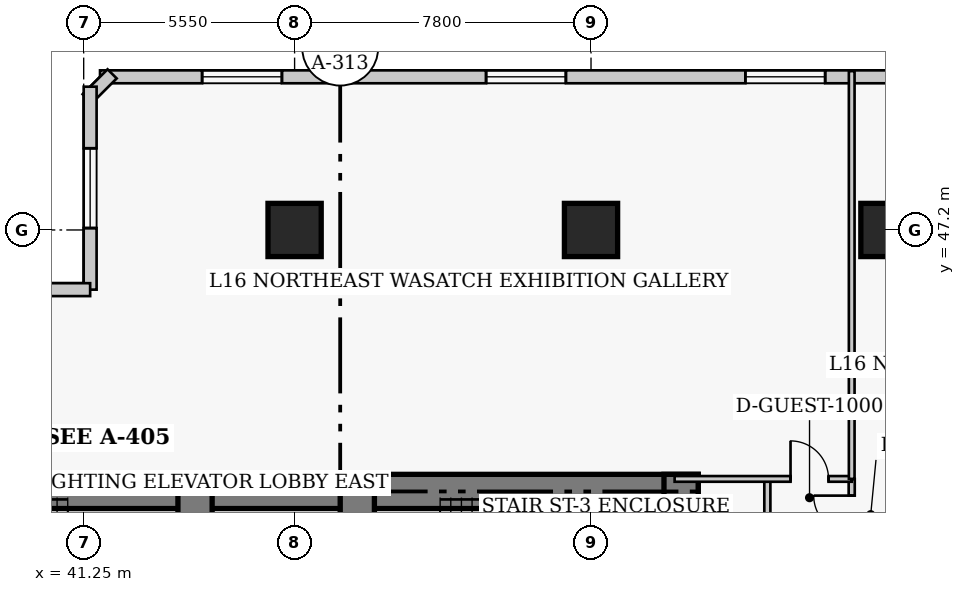
"""IFC4 building model, lengths in metres.
Left out: names, types, materials, properties, quantities, classifications, styles, units other than length and angle.
Written with IfcOpenShell. Run it as: python <this file> out.ifc"""

import sys

from ifc_helpers import new_model, si_unit, direction, frame, frame_2d, origin, origin_2d, place, context, subcontext, project, spatial, rectangle, extrude, element, fill, save


model = new_model("IFC4")
c1 = context("Model", 3, precision=1e-05, world=origin(), true_north=direction((0.0, 1.0)))
c2 = subcontext(c1, "Body", "Model", "MODEL_VIEW")
j1 = project(units=[si_unit("LENGTHUNIT", "METRE"), si_unit("PLANEANGLEUNIT", "RADIAN")], contexts=[c1])
p1 = place(None, origin())
s1 = spatial("IfcSite", under=j1, at=p1, CompositionType="ELEMENT")
p2 = place(p1, origin())
s2 = spatial("IfcBuilding", under=s1, at=p2, CompositionType="ELEMENT")
p3 = place(p2, frame((0.0, 0.0, 67.8)))
s3 = spatial("IfcBuildingStorey", under=s2, at=p3, CompositionType="ELEMENT", Elevation=67.8)
p4 = place(p3, frame((35.85, 40.32, 0.0), z_axis=(0.0, 0.0, 1.0), x_axis=(1.0, 0.0, 0.0)))
e1 = element("IfcWall", 1, at=p4, inside=s3, PredefinedType="SHEAR", context=c2, shape_type="SweptSolid", body=[
    extrude(rectangle(XDim=12.6, YDim=0.9, at=frame_2d((6.3, 0.0))), origin(), (0.0, 0.0, 1.0), 3.8),
])
p5 = place(p3, frame((48.45, 40.32, 0.0), z_axis=(0.0, 0.0, 1.0), x_axis=(1.0, 0.0, 0.0)))
e2 = element("IfcWall", 2, at=p5, inside=s3, PredefinedType="SHEAR", context=c2, shape_type="SweptSolid", body=[
    extrude(rectangle(XDim=8.97, YDim=0.9, at=frame_2d((4.485, 0.0))), origin(), (0.0, 0.0, 1.0), 3.8),
])
p6 = place(p3, frame((56.97, 27.05, 0.0), z_axis=(0.0, 0.0, 1.0), x_axis=(0.0, 1.0, 0.0)))
e3 = element("IfcWall", 3, at=p6, inside=s3, PredefinedType="SHEAR", context=c2, shape_type="SweptSolid", body=[
    extrude(rectangle(XDim=13.72, YDim=0.9, at=frame_2d((6.86, 0.0))), origin(), (0.0, 0.0, 1.0), 3.8),
])
p7 = place(p3, frame((44.18, 36.37, 0.0), z_axis=(0.0, 0.0, 1.0), x_axis=(0.0, 1.0, 0.0)))
e4 = element("IfcWall", 4, at=p7, inside=s3, PredefinedType="SHEAR", context=c2, shape_type="SweptSolid", body=[
    extrude(rectangle(XDim=3.95, YDim=0.9, at=frame_2d((1.975, 0.0))), origin(), (0.0, 0.0, 1.0), 3.8),
])
p8 = place(p3, frame((48.45, 32.3, 0.0), z_axis=(0.0, 0.0, 1.0), x_axis=(0.0, 1.0, 0.0)))
e5 = element("IfcWall", 5, at=p8, inside=s3, PredefinedType="SHEAR", context=c2, shape_type="SweptSolid", body=[
    extrude(rectangle(XDim=8.02, YDim=0.9, at=frame_2d((4.01, 0.0))), origin(), (0.0, 0.0, 1.0), 3.8),
])
p9 = place(p8, frame((5.9, 0.0, 0.0)))
e6 = element("IfcOpeningElement", 6, at=p9, cuts=e5, PredefinedType="OPENING", context=c2, shape_type="SweptSolid", body=[
    extrude(rectangle(XDim=1.1, YDim=2.15, at=frame_2d((0.55, 1.075))), frame((0.0, 0.46, 0.0), z_axis=(0.0, -1.0, 0.0), x_axis=(1.0, 0.0, 0.0)), (0.0, 0.0, 1.0), 0.92),
])
for number, where, z_axis, x_axis in (
    (7, (46.8, 47.2, 0.0), (0.0, 0.0, 1.0), (1.0, 0.0, 0.0)),
    (8, (54.6, 47.2, 0.0), (0.0, 0.0, 1.0), (1.0, 0.0, 0.0)),
    (9, (62.4, 47.2, 0.0), (0.0, 0.0, 1.0), (1.0, 0.0, 0.0)),
):
    element("IfcColumn", number, at=place(p3, frame(where, z_axis=z_axis, x_axis=x_axis)), inside=s3, PredefinedType="COLUMN", context=c2, shape_type="SweptSolid", body=[
        extrude(rectangle(XDim=1.4, YDim=1.4, at=origin_2d()), origin(), (0.0, 0.0, 1.0), 3.8),
    ])
p10 = place(p3, frame((71.57, 51.23, 0.0), z_axis=(0.0, 0.0, 1.0), x_axis=(-1.0, 0.0, 0.0)))
e10 = element("IfcWall", 10, at=p10, inside=s3, PredefinedType="SOLIDWALL", context=c2, shape_type="SweptSolid", body=[
    extrude(rectangle(XDim=29.89, YDim=0.34, at=frame_2d((14.945, 0.0))), origin(), (0.0, 0.0, 1.0), 3.54),
])
p11 = place(p10, frame((2.686, 0.0, 0.85)))
e11 = element("IfcOpeningElement", 11, at=p11, cuts=e10, PredefinedType="OPENING", context=c2, shape_type="SweptSolid", body=[
    extrude(rectangle(XDim=2.1, YDim=1.85, at=frame_2d((1.05, 0.925))), frame((0.0, 0.18, 0.0), z_axis=(0.0, -1.0, 0.0), x_axis=(1.0, 0.0, 0.0)), (0.0, 0.0, 1.0), 0.36),
])
p12 = place(p10, frame((10.809, 0.0, 0.85)))
e12 = element("IfcOpeningElement", 12, at=p12, cuts=e10, PredefinedType="OPENING", context=c2, shape_type="SweptSolid", body=[
    extrude(rectangle(XDim=2.1, YDim=1.85, at=frame_2d((1.05, 0.925))), frame((0.0, 0.18, 0.0), z_axis=(0.0, -1.0, 0.0), x_axis=(1.0, 0.0, 0.0)), (0.0, 0.0, 1.0), 0.36),
])
p13 = place(p10, frame((17.631, 0.0, 0.85)))
e13 = element("IfcOpeningElement", 13, at=p13, cuts=e10, PredefinedType="OPENING", context=c2, shape_type="SweptSolid", body=[
    extrude(rectangle(XDim=2.1, YDim=1.85, at=frame_2d((1.05, 0.925))), frame((0.0, 0.18, 0.0), z_axis=(0.0, -1.0, 0.0), x_axis=(1.0, 0.0, 0.0)), (0.0, 0.0, 1.0), 0.36),
])
p14 = place(p10, frame((25.104, 0.0, 0.85)))
e14 = element("IfcOpeningElement", 14, at=p14, cuts=e10, PredefinedType="OPENING", context=c2, shape_type="SweptSolid", body=[
    extrude(rectangle(XDim=2.1, YDim=1.85, at=frame_2d((1.05, 0.925))), frame((0.0, 0.18, 0.0), z_axis=(0.0, -1.0, 0.0), x_axis=(1.0, 0.0, 0.0)), (0.0, 0.0, 1.0), 0.36),
])
p15 = place(p3, frame((41.999, 51.308, 0.0), z_axis=(0.0, 0.0, 1.0), x_axis=(-0.707238225886, -0.706975312048, 0.0)))
e15 = element("IfcWall", 15, at=p15, inside=s3, PredefinedType="SOLIDWALL", context=c2, shape_type="SweptSolid", body=[
    extrude(rectangle(XDim=0.929, YDim=0.34, at=frame_2d((0.464, 0.0))), origin(), (0.0, 0.0, 1.0), 3.54),
])
p16 = place(p3, frame((41.42, 50.97, 0.0), z_axis=(0.0, 0.0, 1.0), x_axis=(0.0, -1.0, 0.0)))
e16 = element("IfcWall", 16, at=p16, inside=s3, PredefinedType="SOLIDWALL", context=c2, shape_type="SweptSolid", body=[
    extrude(rectangle(XDim=5.34, YDim=0.34, at=frame_2d((2.67, 0.0))), origin(), (0.0, 0.0, 1.0), 3.54),
])
p17 = place(p16, frame((1.62, 0.0, 0.85)))
e17 = element("IfcOpeningElement", 17, at=p17, cuts=e16, PredefinedType="OPENING", context=c2, shape_type="SweptSolid", body=[
    extrude(rectangle(XDim=2.1, YDim=1.85, at=frame_2d((1.05, 0.925))), frame((0.0, 0.18, 0.0), z_axis=(0.0, -1.0, 0.0), x_axis=(1.0, 0.0, 0.0)), (0.0, 0.0, 1.0), 0.36),
])
p18 = place(p3, frame((41.42, 45.63, 0.0), z_axis=(0.0, 0.0, 1.0), x_axis=(-1.0, 0.0, 0.0)))
e18 = element("IfcWall", 18, at=p18, inside=s3, PredefinedType="SOLIDWALL", context=c2, shape_type="SweptSolid", body=[
    extrude(rectangle(XDim=4.84, YDim=0.34, at=frame_2d((2.42, 0.0))), origin(), (0.0, 0.0, 1.0), 3.54),
])
p19 = place(p18, frame((1.37, 0.0, 0.85)))
e19 = element("IfcOpeningElement", 19, at=p19, cuts=e18, PredefinedType="OPENING", context=c2, shape_type="SweptSolid", body=[
    extrude(rectangle(XDim=2.1, YDim=1.85, at=frame_2d((1.05, 0.925))), frame((0.0, 0.18, 0.0), z_axis=(0.0, -1.0, 0.0), x_axis=(1.0, 0.0, 0.0)), (0.0, 0.0, 1.0), 0.36),
])
p20 = place(p3, frame((61.46, 10.25, 0.0), z_axis=(0.0, 0.0, 1.0), x_axis=(0.0, 1.0, 0.0)))
e20 = element("IfcWall", 20, at=p20, inside=s3, PredefinedType="PARTITIONING", context=c2, shape_type="SweptSolid", body=[
    extrude(rectangle(XDim=30.4, YDim=0.16, at=frame_2d((15.2, 0.0))), origin(), (0.0, 0.0, 1.0), 3.54),
])
p21 = place(p20, frame((4.4, 0.0, 0.0)))
e21 = element("IfcOpeningElement", 21, at=p21, cuts=e20, PredefinedType="OPENING", context=c2, shape_type="SweptSolid", body=[
    extrude(rectangle(XDim=0.95, YDim=2.1, at=frame_2d((0.475, 1.05))), frame((0.0, 0.09, 0.0), z_axis=(0.0, -1.0, 0.0), x_axis=(1.0, 0.0, 0.0)), (0.0, 0.0, 1.0), 0.18),
])
p22 = place(p20, frame((13.337, 0.0, 0.0)))
e22 = element("IfcOpeningElement", 22, at=p22, cuts=e20, PredefinedType="OPENING", context=c2, shape_type="SweptSolid", body=[
    extrude(rectangle(XDim=0.95, YDim=2.1, at=frame_2d((0.475, 1.05))), frame((0.0, 0.09, 0.0), z_axis=(0.0, -1.0, 0.0), x_axis=(1.0, 0.0, 0.0)), (0.0, 0.0, 1.0), 0.18),
])
p23 = place(p20, frame((21.462, 0.0, 0.0)))
e23 = element("IfcOpeningElement", 23, at=p23, cuts=e20, PredefinedType="OPENING", context=c2, shape_type="SweptSolid", body=[
    extrude(rectangle(XDim=0.95, YDim=2.1, at=frame_2d((0.475, 1.05))), frame((0.0, 0.09, 0.0), z_axis=(0.0, -1.0, 0.0), x_axis=(1.0, 0.0, 0.0)), (0.0, 0.0, 1.0), 0.18),
])
p24 = place(p20, frame((28.96, 0.0, 0.0)))
e24 = element("IfcOpeningElement", 24, at=p24, cuts=e20, PredefinedType="OPENING", context=c2, shape_type="SweptSolid", body=[
    extrude(rectangle(XDim=1.0, YDim=2.15, at=frame_2d((0.5, 1.075))), frame((0.0, 0.09, 0.0), z_axis=(0.0, -1.0, 0.0), x_axis=(1.0, 0.0, 0.0)), (0.0, 0.0, 1.0), 0.18),
])
p25 = place(p3, frame((59.24, 26.26, 0.0), z_axis=(0.0, 0.0, 1.0), x_axis=(0.0, 1.0, 0.0)))
e25 = element("IfcWall", 25, at=p25, inside=s3, PredefinedType="PARTITIONING", context=c2, shape_type="SweptSolid", body=[
    extrude(rectangle(XDim=14.39, YDim=0.16, at=frame_2d((7.195, 0.0))), origin(), (0.0, 0.0, 1.0), 3.54),
])
p26 = place(p3, frame((56.8, 40.65, 0.0), z_axis=(0.0, 0.0, 1.0), x_axis=(1.0, 0.0, 0.0)))
e26 = element("IfcWall", 26, at=p26, inside=s3, PredefinedType="PARTITIONING", context=c2, shape_type="SweptSolid", body=[
    extrude(rectangle(XDim=4.66, YDim=0.15, at=frame_2d((2.33, 0.0))), origin(), (0.0, 0.0, 1.0), 3.54),
])
p27 = place(p26, frame((3.05, 0.0, 0.0)))
e27 = element("IfcOpeningElement", 27, at=p27, cuts=e26, PredefinedType="OPENING", context=c2, shape_type="SweptSolid", body=[
    extrude(rectangle(XDim=1.0, YDim=2.15, at=frame_2d((0.5, 1.075))), frame((0.0, 0.085, 0.0), z_axis=(0.0, -1.0, 0.0), x_axis=(1.0, 0.0, 0.0)), (0.0, 0.0, 1.0), 0.17),
])
p28 = place(p3, frame((61.46, 40.65, 0.0), z_axis=(0.0, 0.0, 1.0), x_axis=(0.0, 1.0, 0.0)))
e28 = element("IfcWall", 28, at=p28, inside=s3, PredefinedType="PARTITIONING", context=c2, shape_type="SweptSolid", body=[
    extrude(rectangle(XDim=10.73, YDim=0.15, at=frame_2d((5.365, 0.0))), origin(), (0.0, 0.0, 1.0), 3.54),
])
p29 = place(p12, origin())
e29 = element("IfcWindow", 29, at=p29, inside=s3, PartitioningType="SINGLE_PANEL", PredefinedType="WINDOW", context=c2, shape_type="SweptSolid", body=[
    extrude(rectangle(XDim=2.1, YDim=1.85, at=frame_2d((1.05, 0.925))), frame((0.0, 0.03, 0.0), z_axis=(0.0, -1.0, 0.0), x_axis=(1.0, 0.0, 0.0)), (0.0, 0.0, 1.0), 0.06),
])
fill(e12, e29)
p30 = place(p13, origin())
e30 = element("IfcWindow", 30, at=p30, inside=s3, PartitioningType="SINGLE_PANEL", PredefinedType="WINDOW", context=c2, shape_type="SweptSolid", body=[
    extrude(rectangle(XDim=2.1, YDim=1.85, at=frame_2d((1.05, 0.925))), frame((0.0, 0.03, 0.0), z_axis=(0.0, -1.0, 0.0), x_axis=(1.0, 0.0, 0.0)), (0.0, 0.0, 1.0), 0.06),
])
fill(e13, e30)
p31 = place(p14, origin())
e31 = element("IfcWindow", 31, at=p31, inside=s3, PartitioningType="SINGLE_PANEL", PredefinedType="WINDOW", context=c2, shape_type="SweptSolid", body=[
    extrude(rectangle(XDim=2.1, YDim=1.85, at=frame_2d((1.05, 0.925))), frame((0.0, 0.03, 0.0), z_axis=(0.0, -1.0, 0.0), x_axis=(1.0, 0.0, 0.0)), (0.0, 0.0, 1.0), 0.06),
])
fill(e14, e31)
p32 = place(p17, origin())
e32 = element("IfcWindow", 32, at=p32, inside=s3, PartitioningType="SINGLE_PANEL", PredefinedType="WINDOW", context=c2, shape_type="SweptSolid", body=[
    extrude(rectangle(XDim=2.1, YDim=1.85, at=frame_2d((1.05, 0.925))), frame((0.0, 0.03, 0.0), z_axis=(0.0, -1.0, 0.0), x_axis=(1.0, 0.0, 0.0)), (0.0, 0.0, 1.0), 0.06),
])
fill(e17, e32)
p33 = place(p27, origin())
e33 = element("IfcDoor", 33, at=p33, inside=s3, OperationType="SINGLE_SWING_LEFT", PredefinedType="DOOR", context=c2, shape_type="SweptSolid", body=[
    extrude(rectangle(XDim=1.0, YDim=2.15, at=frame_2d((0.5, 1.075))), frame((0.0, 0.025, 0.0), z_axis=(0.0, -1.0, 0.0), x_axis=(1.0, 0.0, 0.0)), (0.0, 0.0, 1.0), 0.05),
])
fill(e27, e33)
p34 = place(p24, origin())
e34 = element("IfcDoor", 34, at=p34, inside=s3, OperationType="SINGLE_SWING_RIGHT", PredefinedType="DOOR", context=c2, shape_type="SweptSolid", body=[
    extrude(rectangle(XDim=1.0, YDim=2.15, at=frame_2d((0.5, 1.075))), frame((0.0, 0.025, 0.0), z_axis=(0.0, -1.0, 0.0), x_axis=(1.0, 0.0, 0.0)), (0.0, 0.0, 1.0), 0.05),
])
fill(e24, e34)
save(model, sys.argv[1])
